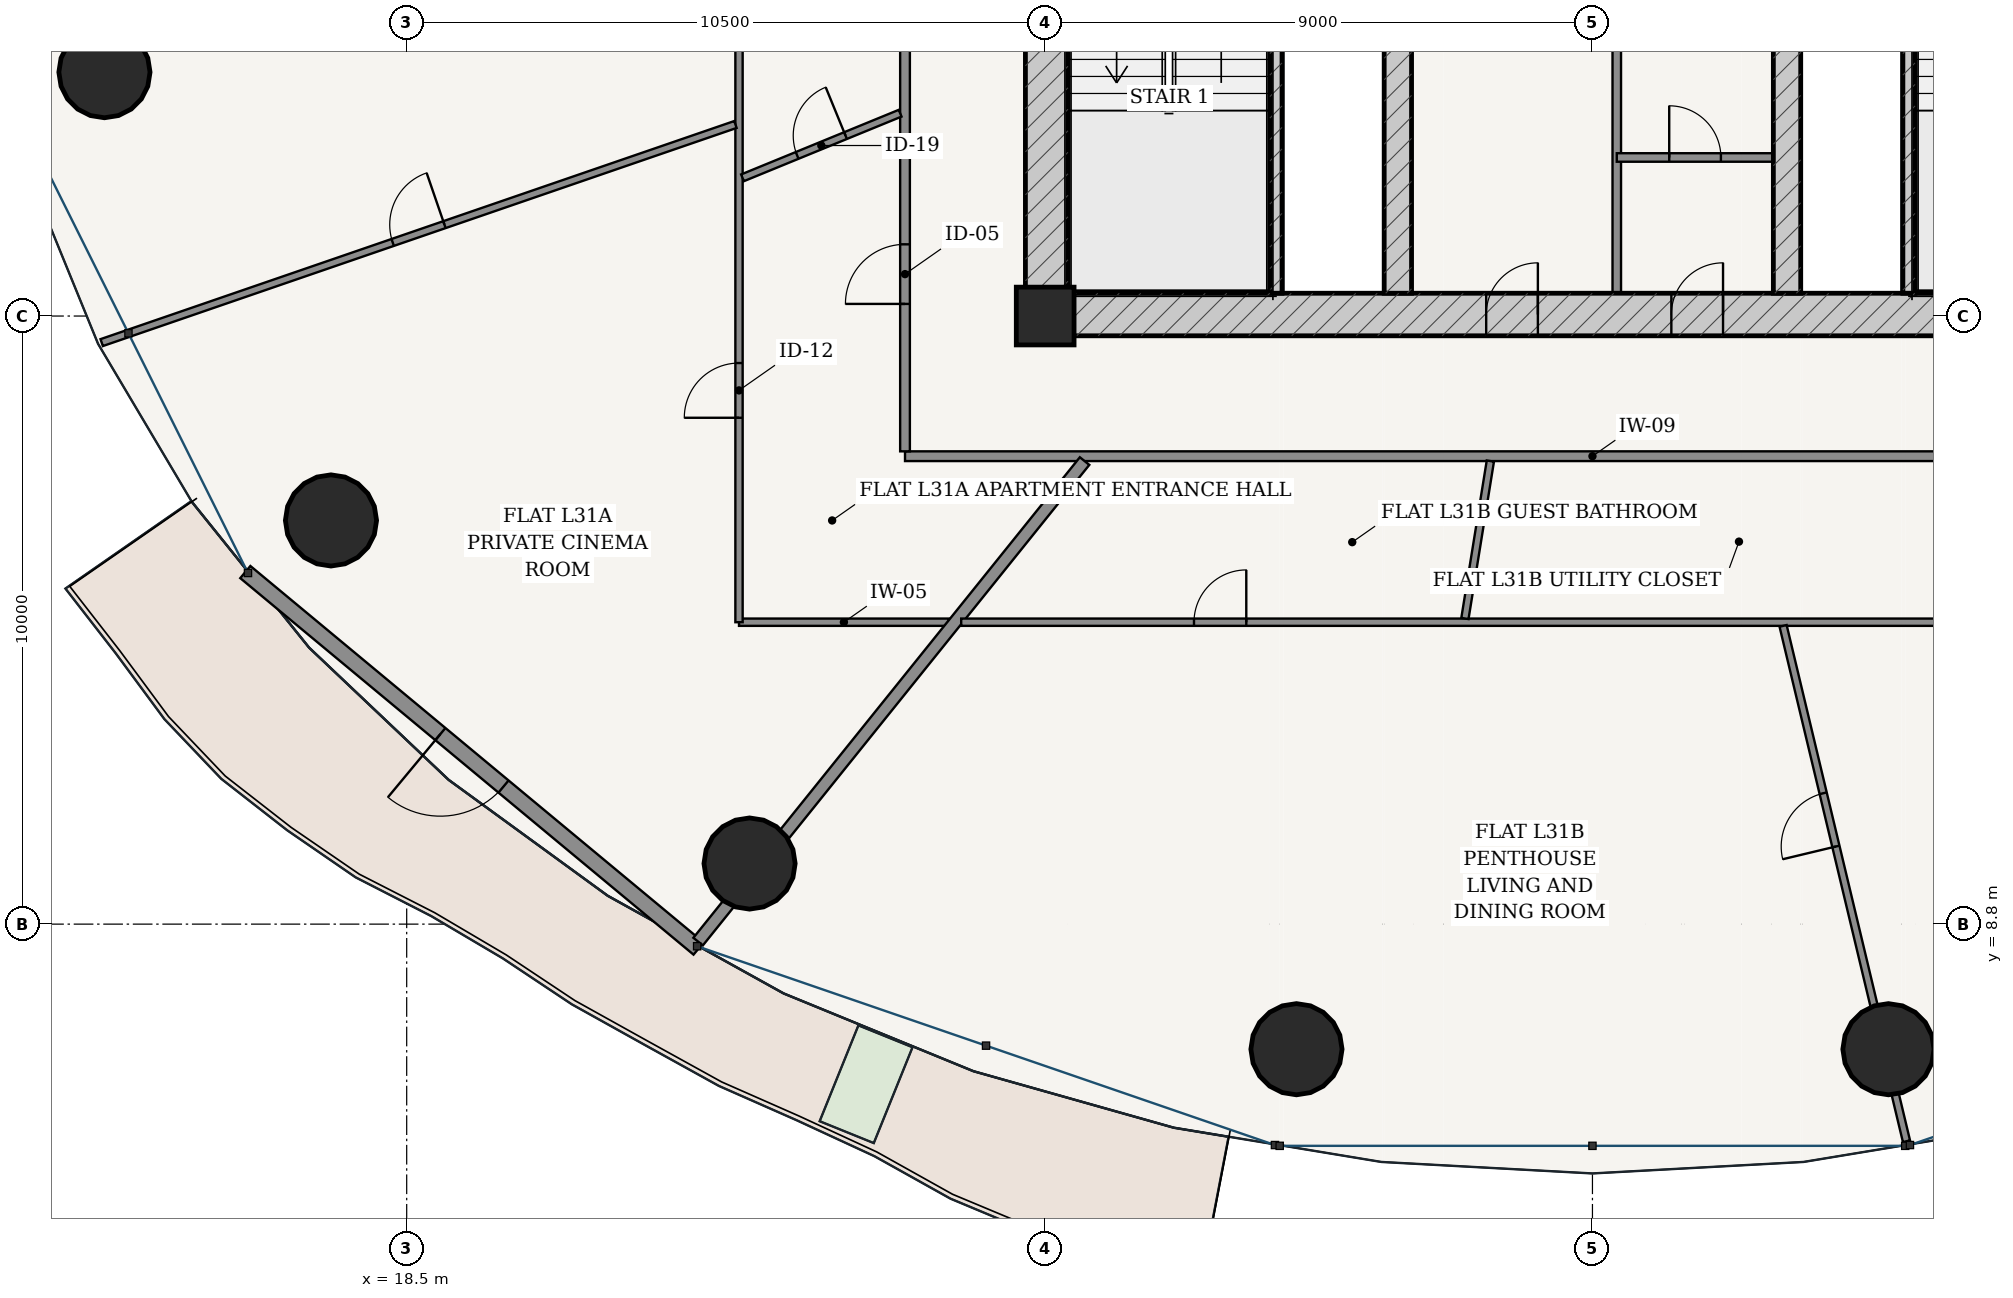
"""IFC4 building model, lengths in metres.
Left out: names, types, materials, properties, quantities, classifications, styles, units other than length and angle.
Written with IfcOpenShell. Run it as: python <this file> out.ifc"""

import sys

from ifc_helpers import new_model, si_unit, direction, frame, frame_2d, origin, origin_2d, place, context, subcontext, project, spatial, rectangle, hollow_circle, extrude, source, transform, mapped, element, fill, save


model = new_model("IFC4")
c1 = context("Model", 3, precision=1e-05, world=origin(), true_north=direction((-0.2419218956, 0.970295726276)))
c2 = subcontext(c1, "Body", "Model", "MODEL_VIEW")
j1 = project(units=[si_unit("LENGTHUNIT", "METRE"), si_unit("PLANEANGLEUNIT", "RADIAN")], contexts=[c1])
p1 = place(None, origin())
s1 = spatial("IfcSite", under=j1, at=p1, CompositionType="ELEMENT")
p2 = place(p1, origin())
s2 = spatial("IfcBuilding", under=s1, at=p2, CompositionType="ELEMENT")
p3 = place(p2, frame((0.0, 0.0, 119.4)))
s3 = spatial("IfcBuildingStorey", under=s2, at=p3, CompositionType="ELEMENT", Elevation=119.4)
p4 = place(p3, frame((29.0, 18.8, 0.0), z_axis=(0.0, 0.0, 1.0), x_axis=(1.0, 0.0, 0.0)))
e1 = element("IfcColumn", 1, at=p4, inside=s3, PredefinedType="COLUMN", context=c2, shape_type="SweptSolid", body=[
    extrude(rectangle(XDim=0.95, YDim=0.95, at=origin_2d()), origin(), (0.0, 0.0, 1.0), 3.6),
])
p5 = place(p3, frame((28.675, 18.825, 0.0), z_axis=(0.0, 0.0, 1.0), x_axis=(1.0, 0.0, 0.0)))
e2 = element("IfcWall", 2, at=p5, inside=s3, PredefinedType="SHEAR", context=c2, shape_type="SweptSolid", body=[
    extrude(rectangle(XDim=18.65, YDim=0.7, at=frame_2d((9.325, 0.0))), origin(), (0.0, 0.0, 1.0), 3.325),
])
p6 = place(p5, frame((7.577, 0.0, 0.0)))
e3 = element("IfcOpeningElement", 3, at=p6, cuts=e2, PredefinedType="OPENING", context=c2, shape_type="SweptSolid", body=[
    extrude(rectangle(XDim=0.85, YDim=2.1, at=frame_2d((0.425, 1.05))), frame((0.0, 0.36, 0.0), z_axis=(0.0, -1.0, 0.0), x_axis=(1.0, 0.0, 0.0)), (0.0, 0.0, 1.0), 0.72),
])
p7 = place(p5, frame((10.623, 0.0, 0.0)))
e4 = element("IfcOpeningElement", 4, at=p7, cuts=e2, PredefinedType="OPENING", context=c2, shape_type="SweptSolid", body=[
    extrude(rectangle(XDim=0.85, YDim=2.1, at=frame_2d((0.425, 1.05))), frame((0.0, 0.36, 0.0), z_axis=(0.0, -1.0, 0.0), x_axis=(1.0, 0.0, 0.0)), (0.0, 0.0, 1.0), 0.72),
])
p8 = place(p3, frame((29.025, 19.175, 0.0), z_axis=(0.0, 0.0, 1.0), x_axis=(0.0, 1.0, 0.0)))
e5 = element("IfcWall", 5, at=p8, inside=s3, PredefinedType="SHEAR", context=c2, shape_type="SweptSolid", body=[
    extrude(rectangle(XDim=15.25, YDim=0.7, at=frame_2d((7.625, 0.0))), origin(), (0.0, 0.0, 1.0), 3.325),
])
p9 = place(p8, frame((9.875, 0.0, 0.0)))
e6 = element("IfcOpeningElement", 6, at=p9, cuts=e5, PredefinedType="OPENING", context=c2, shape_type="SweptSolid", body=[
    extrude(rectangle(XDim=1.5, YDim=2.2, at=frame_2d((0.75, 1.1))), frame((0.0, 0.36, 0.0), z_axis=(0.0, -1.0, 0.0), x_axis=(1.0, 0.0, 0.0)), (0.0, 0.0, 1.0), 0.72),
])
for number, where, z_axis, x_axis in (
    (7, (32.795, 19.175, 0.0), (0.0, 0.0, 1.0), (0.0, 1.0, 0.0)),
    (8, (43.205, 19.175, 0.0), (0.0, 0.0, 1.0), (0.0, 1.0, 0.0)),
):
    element("IfcWall", number, at=place(p3, frame(where, z_axis=z_axis, x_axis=x_axis)), inside=s3, PredefinedType="SOLIDWALL", context=c2, shape_type="SweptSolid", body=[
        extrude(rectangle(XDim=7.375, YDim=0.2, at=frame_2d((3.688, 0.0))), origin(), (0.0, 0.0, 1.0), 3.325),
    ])
p10 = place(p3, frame((34.8, 19.175, 0.0), z_axis=(0.0, 0.0, 1.0), x_axis=(0.0, 1.0, 0.0)))
e9 = element("IfcWall", 9, at=p10, inside=s3, PredefinedType="SHEAR", context=c2, shape_type="SweptSolid", body=[
    extrude(rectangle(XDim=15.25, YDim=0.45, at=frame_2d((7.625, 0.0))), origin(), (0.0, 0.0, 1.0), 3.325),
])
p11 = place(p10, frame((7.8, 0.0, 0.0)))
e10 = element("IfcOpeningElement", 10, at=p11, cuts=e9, PredefinedType="OPENING", context=c2, shape_type="SweptSolid", body=[
    extrude(rectangle(XDim=1.05, YDim=2.15, at=frame_2d((0.525, 1.075))), frame((0.0, 0.235, 0.0), z_axis=(0.0, -1.0, 0.0), x_axis=(1.0, 0.0, 0.0)), (0.0, 0.0, 1.0), 0.47),
])
p12 = place(p3, frame((41.2, 19.175, 0.0), z_axis=(0.0, 0.0, 1.0), x_axis=(0.0, 1.0, 0.0)))
e11 = element("IfcWall", 11, at=p12, inside=s3, PredefinedType="SHEAR", context=c2, shape_type="SweptSolid", body=[
    extrude(rectangle(XDim=15.25, YDim=0.45, at=frame_2d((7.625, 0.0))), origin(), (0.0, 0.0, 1.0), 3.325),
])
p13 = place(p12, frame((7.8, 0.0, 0.0)))
e12 = element("IfcOpeningElement", 12, at=p13, cuts=e11, PredefinedType="OPENING", context=c2, shape_type="SweptSolid", body=[
    extrude(rectangle(XDim=1.05, YDim=2.15, at=frame_2d((0.525, 1.075))), frame((0.0, 0.235, 0.0), z_axis=(0.0, -1.0, 0.0), x_axis=(1.0, 0.0, 0.0)), (0.0, 0.0, 1.0), 0.47),
])
for number, where, z_axis, x_axis in (
    (13, (13.529, 22.81, 0.0), (0.0, 0.0, 1.0), (1.0, 0.0, 0.0)),
    (14, (17.255, 15.438, 0.0), (0.0, 0.0, 1.0), (1.0, 0.0, 0.0)),
    (15, (24.138, 9.796, 0.0), (0.0, 0.0, 1.0), (1.0, 0.0, 0.0)),
    (16, (33.133, 6.743, 0.0), (0.0, 0.0, 1.0), (1.0, 0.0, 0.0)),
    (17, (42.867, 6.743, 0.0), (0.0, 0.0, 1.0), (1.0, 0.0, 0.0)),
):
    element("IfcColumn", number, at=place(p3, frame(where, z_axis=z_axis, x_axis=x_axis)), inside=s3, PredefinedType="COLUMN", context=c2, shape_type="SweptSolid", body=[
        extrude(hollow_circle(Radius=0.75, WallThickness=0.045, at=origin_2d()), origin(), (0.0, 0.0, 1.0), 3.6),
    ])
p14 = place(p3, frame((15.846, 14.59, 0.0), z_axis=(0.0, 0.0, 1.0), x_axis=(0.769254958887, -0.638941944333, 0.0)))
e18 = element("IfcWall", 18, at=p14, inside=s3, PredefinedType="SOLIDWALL", context=c2, shape_type="SweptSolid", body=[
    extrude(rectangle(XDim=9.69, YDim=0.26, at=frame_2d((4.845, 0.0))), origin(), (0.0, 0.0, 1.0), 3.325),
])
p15 = place(p14, frame((4.17, 0.0, 0.0)))
e19 = element("IfcOpeningElement", 19, at=p15, cuts=e18, PredefinedType="OPENING", context=c2, shape_type="SweptSolid", body=[
    extrude(rectangle(XDim=1.35, YDim=2.2, at=frame_2d((0.675, 1.1))), frame((0.0, 0.14, 0.0), z_axis=(0.0, -1.0, 0.0), x_axis=(1.0, 0.0, 0.0)), (0.0, 0.0, 1.0), 0.28),
])
p16 = place(p3, frame((38.4, 19.175, 0.0), z_axis=(0.0, 0.0, 1.0), x_axis=(0.0, 1.0, 0.0)))
e20 = element("IfcWall", 20, at=p16, inside=s3, PredefinedType="PARTITIONING", context=c2, shape_type="SweptSolid", body=[
    extrude(rectangle(XDim=4.465, YDim=0.14, at=frame_2d((2.232, 0.0))), origin(), (0.0, 0.0, 1.0), 3.325),
])
p17 = place(p3, frame((38.4, 21.407, 0.0), z_axis=(0.0, 0.0, 1.0), x_axis=(1.0, 0.0, 0.0)))
e21 = element("IfcWall", 21, at=p17, inside=s3, PredefinedType="PARTITIONING", context=c2, shape_type="SweptSolid", body=[
    extrude(rectangle(XDim=2.575, YDim=0.14, at=frame_2d((1.288, 0.0))), origin(), (0.0, 0.0, 1.0), 3.325),
])
p18 = place(p17, frame((0.863, 0.0, 0.0)))
e22 = element("IfcOpeningElement", 22, at=p18, cuts=e21, PredefinedType="OPENING", context=c2, shape_type="SweptSolid", body=[
    extrude(rectangle(XDim=0.85, YDim=2.1, at=frame_2d((0.425, 1.05))), frame((0.0, 0.08, 0.0), z_axis=(0.0, -1.0, 0.0), x_axis=(1.0, 0.0, 0.0)), (0.0, 0.0, 1.0), 0.16),
])
p19 = place(p3, frame((26.695, 16.495, 0.0), z_axis=(0.0, 0.0, 1.0), x_axis=(1.0, 0.0, 0.0)))
e23 = element("IfcWall", 23, at=p19, inside=s3, PredefinedType="PARTITIONING", context=c2, shape_type="SweptSolid", body=[
    extrude(rectangle(XDim=22.61, YDim=0.16, at=frame_2d((11.305, 0.0))), origin(), (0.0, 0.0, 1.0), 2.767),
])
p20 = place(p3, frame((26.695, 16.575, 0.0), z_axis=(0.0, 0.0, 1.0), x_axis=(0.0, 1.0, 0.0)))
e24 = element("IfcWall", 24, at=p20, inside=s3, PredefinedType="PARTITIONING", context=c2, shape_type="SweptSolid", body=[
    extrude(rectangle(XDim=20.45, YDim=0.16, at=frame_2d((10.225, 0.0))), origin(), (0.0, 0.0, 1.0), 2.767),
])
p21 = place(p20, frame((2.424, 0.0, 0.0)))
e25 = element("IfcOpeningElement", 25, at=p21, cuts=e24, PredefinedType="OPENING", context=c2, shape_type="SweptSolid", body=[
    extrude(rectangle(XDim=0.98, YDim=2.2, at=frame_2d((0.49, 1.1))), frame((0.0, 0.09, 0.0), z_axis=(0.0, -1.0, 0.0), x_axis=(1.0, 0.0, 0.0)), (0.0, 0.0, 1.0), 0.18),
])
p22 = place(p3, frame((27.415, 13.765, 0.0), z_axis=(0.0, 0.0, 1.0), x_axis=(-1.0, 0.0, 0.0)))
e26 = element("IfcWall", 26, at=p22, inside=s3, PredefinedType="PARTITIONING", context=c2, shape_type="SweptSolid", body=[
    extrude(rectangle(XDim=3.45, YDim=0.12, at=frame_2d((1.725, 0.0))), origin(), (0.0, 0.0, 1.0), 2.767),
])
p23 = place(p3, frame((23.965, 13.765, 0.0), z_axis=(0.0, 0.0, 1.0), x_axis=(0.0, 1.0, 0.0)))
e27 = element("IfcWall", 27, at=p23, inside=s3, PredefinedType="PARTITIONING", context=c2, shape_type="SweptSolid", body=[
    extrude(rectangle(XDim=26.07, YDim=0.12, at=frame_2d((13.035, 0.0))), origin(), (0.0, 0.0, 1.0), 2.767),
])
p24 = place(p23, frame((3.362, 0.0, 0.0)))
e28 = element("IfcOpeningElement", 28, at=p24, cuts=e27, PredefinedType="OPENING", context=c2, shape_type="SweptSolid", body=[
    extrude(rectangle(XDim=0.9, YDim=2.15, at=frame_2d((0.45, 1.075))), frame((0.0, 0.07, 0.0), z_axis=(0.0, -1.0, 0.0), x_axis=(1.0, 0.0, 0.0)), (0.0, 0.0, 1.0), 0.14),
])
p25 = place(p23, frame((13.924, 0.0, 0.0)))
e29 = element("IfcOpeningElement", 29, at=p25, cuts=e27, PredefinedType="OPENING", context=c2, shape_type="SweptSolid", body=[
    extrude(rectangle(XDim=0.9, YDim=2.15, at=frame_2d((0.45, 1.075))), frame((0.0, 0.07, 0.0), z_axis=(0.0, -1.0, 0.0), x_axis=(1.0, 0.0, 0.0)), (0.0, 0.0, 1.0), 0.14),
])
p26 = place(p3, frame((23.906, 21.95, 0.0), z_axis=(0.0, 0.0, 1.0), x_axis=(-0.945573120726, -0.32540970078, 0.0)))
e30 = element("IfcWall", 30, at=p26, inside=s3, PredefinedType="PARTITIONING", context=c2, shape_type="SweptSolid", body=[
    extrude(rectangle(XDim=11.022, YDim=0.12, at=frame_2d((5.511, 0.0))), origin(), (0.0, 0.0, 1.0), 2.767),
])
p27 = place(p26, frame((5.061, 0.0, 0.0)))
e31 = element("IfcOpeningElement", 31, at=p27, cuts=e30, PredefinedType="OPENING", context=c2, shape_type="SweptSolid", body=[
    extrude(rectangle(XDim=0.9, YDim=2.15, at=frame_2d((0.45, 1.075))), frame((0.0, 0.07, 0.0), z_axis=(0.0, -1.0, 0.0), x_axis=(1.0, 0.0, 0.0)), (0.0, 0.0, 1.0), 0.14),
])
p28 = place(p3, frame((26.615, 22.135, 0.0), z_axis=(0.0, 0.0, 1.0), x_axis=(-0.925337216259, -0.379145138708, 0.0)))
e32 = element("IfcWall", 32, at=p28, inside=s3, PredefinedType="PARTITIONING", context=c2, shape_type="SweptSolid", body=[
    extrude(rectangle(XDim=2.802, YDim=0.12, at=frame_2d((1.401, 0.0))), origin(), (0.0, 0.0, 1.0), 3.325),
])
p29 = place(p28, frame((0.971, 0.0, 0.0)))
e33 = element("IfcOpeningElement", 33, at=p29, cuts=e32, PredefinedType="OPENING", context=c2, shape_type="SweptSolid", body=[
    extrude(rectangle(XDim=0.86, YDim=2.15, at=frame_2d((0.43, 1.075))), frame((0.0, 0.07, 0.0), z_axis=(0.0, -1.0, 0.0), x_axis=(1.0, 0.0, 0.0)), (0.0, 0.0, 1.0), 0.14),
])
p30 = place(p3, frame((29.648, 16.415, 0.0), z_axis=(0.0, 0.0, 1.0), x_axis=(-0.626701127389, -0.779259710834, 0.0)))
e34 = element("IfcWall", 34, at=p30, inside=s3, PredefinedType="PARTITIONING", context=c2, shape_type="SweptSolid", body=[
    extrude(rectangle(XDim=10.141, YDim=0.2, at=frame_2d((5.071, 0.0))), origin(), (0.0, 0.0, 1.0), 2.767),
])
p31 = place(p3, frame((52.035, 13.765, 0.0), z_axis=(0.0, 0.0, 1.0), x_axis=(-1.0, 0.0, 0.0)))
e35 = element("IfcWall", 35, at=p31, inside=s3, PredefinedType="PARTITIONING", context=c2, shape_type="SweptSolid", body=[
    extrude(rectangle(XDim=24.416, YDim=0.12, at=frame_2d((12.208, 0.0))), origin(), (0.0, 0.0, 1.0), 2.767),
])
p32 = place(p31, frame((4.192, 0.0, 0.0)))
e36 = element("IfcOpeningElement", 36, at=p32, cuts=e35, PredefinedType="OPENING", context=c2, shape_type="SweptSolid", body=[
    extrude(rectangle(XDim=0.9, YDim=2.15, at=frame_2d((0.45, 1.075))), frame((0.0, 0.07, 0.0), z_axis=(0.0, -1.0, 0.0), x_axis=(1.0, 0.0, 0.0)), (0.0, 0.0, 1.0), 0.14),
])
p33 = place(p31, frame((19.728, 0.0, 0.0)))
e37 = element("IfcOpeningElement", 37, at=p33, cuts=e35, PredefinedType="OPENING", context=c2, shape_type="SweptSolid", body=[
    extrude(rectangle(XDim=0.86, YDim=2.15, at=frame_2d((0.43, 1.075))), frame((0.0, 0.07, 0.0), z_axis=(0.0, -1.0, 0.0), x_axis=(1.0, 0.0, 0.0)), (0.0, 0.0, 1.0), 0.14),
])
p34 = place(p3, frame((41.135, 13.705, 0.0), z_axis=(0.0, 0.0, 1.0), x_axis=(0.23282725047, -0.97251810854, 0.0)))
e38 = element("IfcWall", 38, at=p34, inside=s3, PredefinedType="PARTITIONING", context=c2, shape_type="SweptSolid", body=[
    extrude(rectangle(XDim=8.715, YDim=0.12, at=frame_2d((4.357, 0.0))), origin(), (0.0, 0.0, 1.0), 2.767),
])
p35 = place(p34, frame((2.831, 0.0, 0.0)))
e39 = element("IfcOpeningElement", 39, at=p35, cuts=e38, PredefinedType="OPENING", context=c2, shape_type="SweptSolid", body=[
    extrude(rectangle(XDim=0.9, YDim=2.15, at=frame_2d((0.45, 1.075))), frame((0.0, 0.07, 0.0), z_axis=(0.0, -1.0, 0.0), x_axis=(1.0, 0.0, 0.0)), (0.0, 0.0, 1.0), 0.14),
])
p36 = place(p3, frame((36.321, 16.415, 0.0), z_axis=(0.0, 0.0, 1.0), x_axis=(-0.159566101486, -0.9871872463, 0.0)))
e40 = element("IfcWall", 40, at=p36, inside=s3, PredefinedType="PARTITIONING", context=c2, shape_type="SweptSolid", body=[
    extrude(rectangle(XDim=2.623, YDim=0.12, at=frame_2d((1.311, 0.0))), origin(), (0.0, 0.0, 1.0), 3.325),
])
m1 = source(origin(), c2, "Body", "SweptSolid", [
    extrude(rectangle(XDim=1.35, YDim=2.2, at=frame_2d((0.675, 1.1))), frame((0.0, 0.025, 0.0), z_axis=(0.0, -1.0, 0.0), x_axis=(1.0, 0.0, 0.0)), (0.0, 0.0, 1.0), 0.05),
])
p37 = place(p15, frame((1.35, 0.0, 0.0), z_axis=(0.0, 0.0, 1.0), x_axis=(-1.0, 0.0, 0.0)))
e41 = element("IfcDoor", 41, at=p37, inside=s3, OperationType="SINGLE_SWING_RIGHT", PredefinedType="DOOR", context=c2, shape_type="MappedRepresentation", body=[
    mapped(m1, transform((0.0, 0.0, 0.0), scale=1.0)),
])
fill(e19, e41)
m2 = source(origin(), c2, "Body", "SweptSolid", [
    extrude(rectangle(XDim=0.85, YDim=2.1, at=frame_2d((0.425, 1.05))), frame((0.0, 0.025, 0.0), z_axis=(0.0, -1.0, 0.0), x_axis=(1.0, 0.0, 0.0)), (0.0, 0.0, 1.0), 0.05),
])
p38 = place(p6, origin())
e42 = element("IfcDoor", 42, at=p38, inside=s3, OperationType="SINGLE_SWING_RIGHT", PredefinedType="DOOR", context=c2, shape_type="MappedRepresentation", body=[
    mapped(m2, transform((0.0, 0.0, 0.0), scale=1.0)),
])
fill(e3, e42)
p39 = place(p7, origin())
e43 = element("IfcDoor", 43, at=p39, inside=s3, OperationType="SINGLE_SWING_RIGHT", PredefinedType="DOOR", context=c2, shape_type="MappedRepresentation", body=[
    mapped(m2, transform((0.0, 0.0, 0.0), scale=1.0)),
])
fill(e4, e43)
p40 = place(p18, origin())
e44 = element("IfcDoor", 44, at=p40, inside=s3, OperationType="SINGLE_SWING_LEFT", PredefinedType="DOOR", context=c2, shape_type="MappedRepresentation", body=[
    mapped(m2, transform((0.0, 0.0, 0.0), scale=1.0)),
])
fill(e22, e44)
m3 = source(origin(), c2, "Body", "SweptSolid", [
    extrude(rectangle(XDim=0.98, YDim=2.2, at=frame_2d((0.49, 1.1))), frame((0.0, 0.025, 0.0), z_axis=(0.0, -1.0, 0.0), x_axis=(1.0, 0.0, 0.0)), (0.0, 0.0, 1.0), 0.05),
])
p41 = place(p21, origin())
e45 = element("IfcDoor", 45, at=p41, inside=s3, OperationType="SINGLE_SWING_LEFT", PredefinedType="DOOR", context=c2, shape_type="MappedRepresentation", body=[
    mapped(m3, transform((0.0, 0.0, 0.0), scale=1.0)),
])
fill(e25, e45)
m4 = source(origin(), c2, "Body", "SweptSolid", [
    extrude(rectangle(XDim=0.86, YDim=2.15, at=frame_2d((0.43, 1.075))), frame((0.0, 0.025, 0.0), z_axis=(0.0, -1.0, 0.0), x_axis=(1.0, 0.0, 0.0)), (0.0, 0.0, 1.0), 0.05),
])
p42 = place(p29, frame((0.86, 0.0, 0.0), z_axis=(0.0, 0.0, 1.0), x_axis=(-1.0, 0.0, 0.0)))
e46 = element("IfcDoor", 46, at=p42, inside=s3, OperationType="SINGLE_SWING_RIGHT", PredefinedType="DOOR", context=c2, shape_type="MappedRepresentation", body=[
    mapped(m4, transform((0.0, 0.0, 0.0), scale=1.0)),
])
fill(e33, e46)
m5 = source(origin(), c2, "Body", "SweptSolid", [
    extrude(rectangle(XDim=0.9, YDim=2.15, at=frame_2d((0.45, 1.075))), frame((0.0, 0.025, 0.0), z_axis=(0.0, -1.0, 0.0), x_axis=(1.0, 0.0, 0.0)), (0.0, 0.0, 1.0), 0.05),
])
p43 = place(p24, origin())
e47 = element("IfcDoor", 47, at=p43, inside=s3, OperationType="SINGLE_SWING_LEFT", PredefinedType="DOOR", context=c2, shape_type="MappedRepresentation", body=[
    mapped(m5, transform((0.0, 0.0, 0.0), scale=1.0)),
])
fill(e28, e47)
p44 = place(p27, frame((0.9, 0.0, 0.0), z_axis=(0.0, 0.0, 1.0), x_axis=(-1.0, 0.0, 0.0)))
e48 = element("IfcDoor", 48, at=p44, inside=s3, OperationType="SINGLE_SWING_RIGHT", PredefinedType="DOOR", context=c2, shape_type="MappedRepresentation", body=[
    mapped(m5, transform((0.0, 0.0, 0.0), scale=1.0)),
])
fill(e31, e48)
p45 = place(p35, frame((0.9, 0.0, 0.0), z_axis=(0.0, 0.0, 1.0), x_axis=(-1.0, 0.0, 0.0)))
e49 = element("IfcDoor", 49, at=p45, inside=s3, OperationType="SINGLE_SWING_LEFT", PredefinedType="DOOR", context=c2, shape_type="MappedRepresentation", body=[
    mapped(m5, transform((0.0, 0.0, 0.0), scale=1.0)),
])
fill(e39, e49)
p46 = place(p33, frame((0.86, 0.0, 0.0), z_axis=(0.0, 0.0, 1.0), x_axis=(-1.0, 0.0, 0.0)))
e50 = element("IfcDoor", 50, at=p46, inside=s3, OperationType="SINGLE_SWING_RIGHT", PredefinedType="DOOR", context=c2, shape_type="MappedRepresentation", body=[
    mapped(m4, transform((0.0, 0.0, 0.0), scale=1.0)),
])
fill(e37, e50)
save(model, sys.argv[1])
